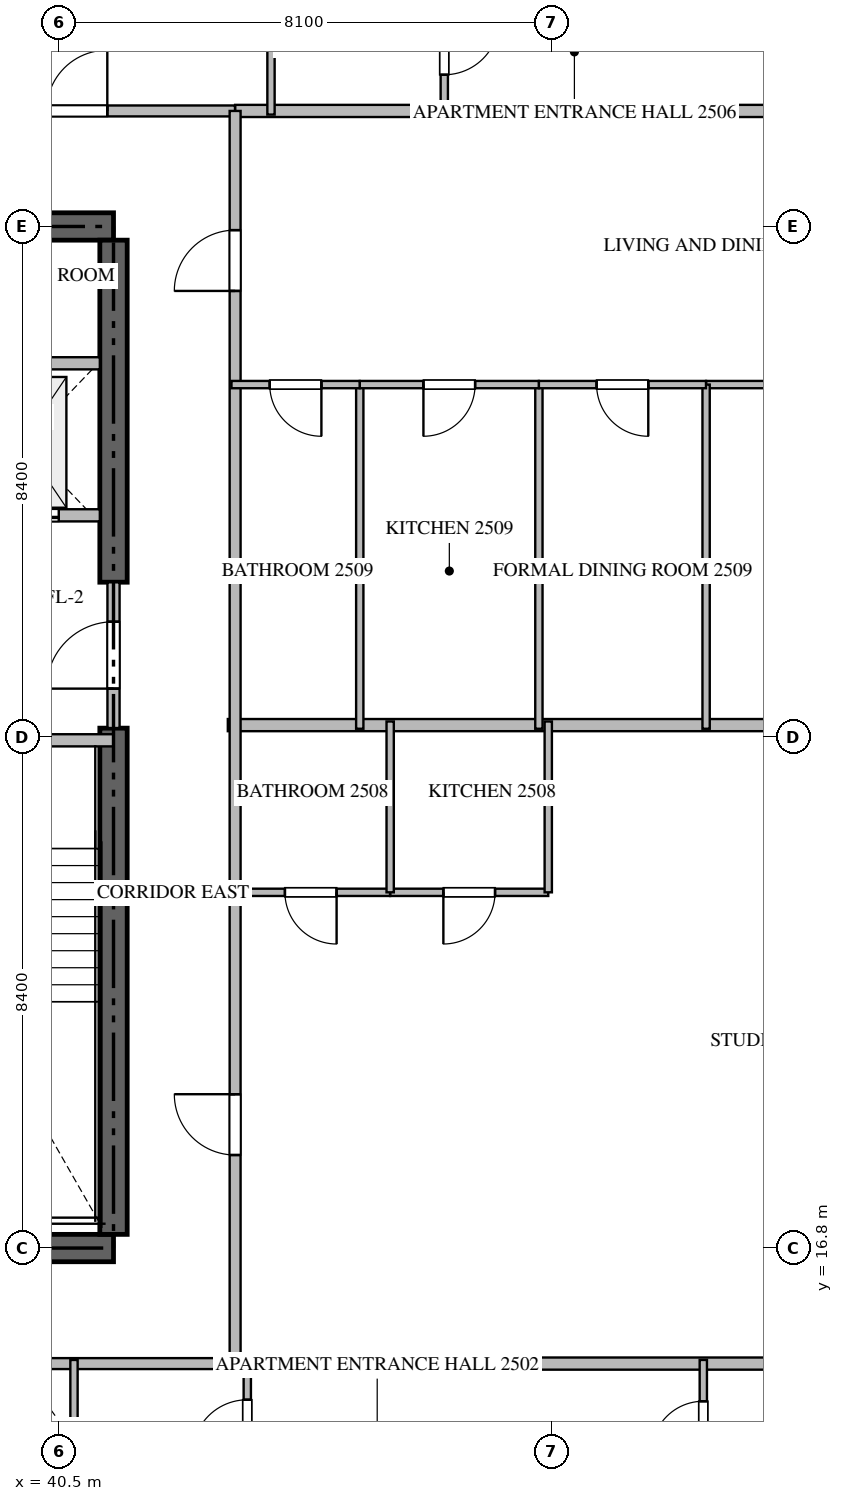
"""IFC4 building model, lengths in metres.
Left out: names, types, materials, properties, quantities, classifications, styles, units other than length and angle.
Written with IfcOpenShell. Run it as: python <this file> out.ifc"""

import sys

from ifc_helpers import new_model, si_unit, direction, frame, frame_2d, origin, place, context, subcontext, project, spatial, rectangle, extrude, source, transform, mapped, element, fill, save


model = new_model("IFC4")
c1 = context("Model", 3, precision=1e-05, world=origin(), true_north=direction((0.0, 1.0)))
c2 = subcontext(c1, "Body", "Model", "MODEL_VIEW")
j1 = project(units=[si_unit("LENGTHUNIT", "METRE"), si_unit("PLANEANGLEUNIT", "RADIAN")], contexts=[c1])
p1 = place(None, origin())
s1 = spatial("IfcSite", under=j1, at=p1, CompositionType="ELEMENT")
p2 = place(p1, origin())
s2 = spatial("IfcBuilding", under=s1, at=p2, CompositionType="ELEMENT")
p3 = place(p2, frame((0.0, 0.0, 101.7)))
s3 = spatial("IfcBuildingStorey", under=s2, at=p3, CompositionType="ELEMENT", Elevation=101.7)
for number, where, z_axis, x_axis in (
    (1, (23.4, 16.8, -0.26), (0.0, 0.0, 1.0), (1.0, 0.0, 0.0)),
    (2, (41.4, 33.6, -0.26), (0.0, 0.0, 1.0), (-1.0, 0.0, 0.0)),
):
    element("IfcWall", number, at=place(p3, frame(where, z_axis=z_axis, x_axis=x_axis)), inside=s3, PredefinedType="SHEAR", context=c2, shape_type="SweptSolid", body=[
        extrude(rectangle(XDim=18.0, YDim=0.45, at=frame_2d((9.0, 0.0))), origin(), (0.0, 0.0, 1.0), 3.748),
    ])
p4 = place(p3, frame((41.4, 17.025, -0.26), z_axis=(0.0, 0.0, 1.0), x_axis=(0.0, 1.0, 0.0)))
e3 = element("IfcWall", 3, at=p4, inside=s3, PredefinedType="SHEAR", context=c2, shape_type="SweptSolid", body=[
    extrude(rectangle(XDim=8.325, YDim=0.45, at=frame_2d((4.163, 0.0))), origin(), (0.0, 0.0, 1.0), 3.748),
])
p5 = place(p3, frame((41.4, 27.75, -0.26), z_axis=(0.0, 0.0, 1.0), x_axis=(0.0, 1.0, 0.0)))
e4 = element("IfcWall", 4, at=p5, inside=s3, PredefinedType="SHEAR", context=c2, shape_type="SweptSolid", body=[
    extrude(rectangle(XDim=5.625, YDim=0.45, at=frame_2d((2.812, 0.0))), origin(), (0.0, 0.0, 1.0), 3.748),
])
p6 = place(p3, frame((36.95, 25.15, 0.0), z_axis=(0.0, 0.0, 1.0), x_axis=(1.0, 0.0, 0.0)))
e5 = element("IfcWall", 5, at=p6, inside=s3, PredefinedType="STANDARD", context=c2, shape_type="SweptSolid", body=[
    extrude(rectangle(XDim=4.45, YDim=0.2, at=frame_2d((2.225, 0.0))), origin(), (0.0, 0.0, 1.0), 3.49),
])
p7 = place(p6, frame((1.65, 0.0, 0.0)))
e6 = element("IfcOpeningElement", 6, at=p7, cuts=e5, PredefinedType="OPENING", context=c2, shape_type="SweptSolid", body=[
    extrude(rectangle(XDim=1.1, YDim=2.15, at=frame_2d((0.55, 1.075))), frame((0.0, 0.11, 0.0), z_axis=(0.0, -1.0, 0.0), x_axis=(1.0, 0.0, 0.0)), (0.0, 0.0, 1.0), 0.22),
])
p8 = place(p3, frame((38.75, 28.85, 0.0), z_axis=(0.0, 0.0, 1.0), x_axis=(1.0, 0.0, 0.0)))
e7 = element("IfcWall", 7, at=p8, inside=s3, PredefinedType="STANDARD", context=c2, shape_type="SweptSolid", body=[
    extrude(rectangle(XDim=2.425, YDim=0.2, at=frame_2d((1.212, 0.0))), origin(), (0.0, 0.0, 1.0), 3.49),
])
p9 = place(p8, frame((0.55, 0.0, 0.0)))
e8 = element("IfcOpeningElement", 8, at=p9, cuts=e7, PredefinedType="OPENING", context=c2, shape_type="SweptSolid", body=[
    extrude(rectangle(XDim=1.2, YDim=2.2, at=frame_2d((0.6, 1.1))), frame((0.0, 0.11, 0.0), z_axis=(0.0, -1.0, 0.0), x_axis=(1.0, 0.0, 0.0)), (0.0, 0.0, 1.0), 0.22),
])
p10 = place(p3, frame((38.75, 31.35, 0.0), z_axis=(0.0, 0.0, 1.0), x_axis=(1.0, 0.0, 0.0)))
e9 = element("IfcWall", 9, at=p10, inside=s3, PredefinedType="STANDARD", context=c2, shape_type="SweptSolid", body=[
    extrude(rectangle(XDim=2.425, YDim=0.2, at=frame_2d((1.212, 0.0))), origin(), (0.0, 0.0, 1.0), 3.49),
])
p11 = place(p3, frame((41.4, 25.352, 0.0), z_axis=(0.0, 0.0, 1.0), x_axis=(0.0, 1.0, 0.0)))
e10 = element("IfcWall", 10, at=p11, inside=s3, PredefinedType="STANDARD", context=c2, shape_type="SweptSolid", body=[
    extrude(rectangle(XDim=2.396, YDim=0.2, at=frame_2d((1.198, 0.0))), origin(), (0.0, 0.0, 1.0), 3.49),
])
p12 = place(p11, frame((0.648, 0.0, 0.0)))
e11 = element("IfcOpeningElement", 11, at=p12, cuts=e10, PredefinedType="OPENING", context=c2, shape_type="SweptSolid", body=[
    extrude(rectangle(XDim=1.1, YDim=2.15, at=frame_2d((0.55, 1.075))), frame((0.0, 0.11, 0.0), z_axis=(0.0, -1.0, 0.0), x_axis=(1.0, 0.0, 0.0)), (0.0, 0.0, 1.0), 0.22),
])
p13 = place(p3, frame((43.28, 25.4, 0.0), z_axis=(0.0, 0.0, 1.0), x_axis=(1.0, 0.0, 0.0)))
e12 = element("IfcWall", 12, at=p13, inside=s3, PredefinedType="PARTITIONING", context=c2, shape_type="SweptSolid", body=[
    extrude(rectangle(XDim=15.438, YDim=0.2, at=frame_2d((7.719, 0.0))), origin(), (0.0, 0.0, 1.0), 3.49),
])
for number, where, z_axis, x_axis in (
    (13, (43.4, 14.9, 0.0), (0.0, 0.0, 1.0), (1.0, 0.0, 0.0)),
    (14, (43.4, 35.5, 0.0), (0.0, 0.0, 1.0), (1.0, 0.0, 0.0)),
):
    element("IfcWall", number, at=place(p3, frame(where, z_axis=z_axis, x_axis=x_axis)), inside=s3, PredefinedType="PARTITIONING", context=c2, shape_type="SweptSolid", body=[
        extrude(rectangle(XDim=15.318, YDim=0.2, at=frame_2d((7.659, 0.0))), origin(), (0.0, 0.0, 1.0), 3.49),
    ])
p14 = place(p3, frame((21.402, 14.9, 0.0), z_axis=(0.0, 0.0, 1.0), x_axis=(1.0, 0.0, 0.0)))
e15 = element("IfcWall", 15, at=p14, inside=s3, PredefinedType="PARTITIONING", context=c2, shape_type="SweptSolid", body=[
    extrude(rectangle(XDim=21.996, YDim=0.18, at=frame_2d((10.998, 0.0))), origin(), (0.0, 0.0, 1.0), 3.49),
])
p15 = place(p14, frame((10.351, 0.0, 0.0)))
e16 = element("IfcOpeningElement", 16, at=p15, cuts=e15, PredefinedType="OPENING", context=c2, shape_type="SweptSolid", body=[
    extrude(rectangle(XDim=1.0, YDim=2.15, at=frame_2d((0.5, 1.075))), frame((0.0, 0.1, 0.0), z_axis=(0.0, -1.0, 0.0), x_axis=(1.0, 0.0, 0.0)), (0.0, 0.0, 1.0), 0.2),
])
p16 = place(p14, frame((15.978, 0.0, 0.0)))
e17 = element("IfcOpeningElement", 17, at=p16, cuts=e15, PredefinedType="OPENING", context=c2, shape_type="SweptSolid", body=[
    extrude(rectangle(XDim=1.0, YDim=2.15, at=frame_2d((0.5, 1.075))), frame((0.0, 0.1, 0.0), z_axis=(0.0, -1.0, 0.0), x_axis=(1.0, 0.0, 0.0)), (0.0, 0.0, 1.0), 0.2),
])
p17 = place(p3, frame((21.402, 35.5, 0.0), z_axis=(0.0, 0.0, 1.0), x_axis=(1.0, 0.0, 0.0)))
e18 = element("IfcWall", 18, at=p17, inside=s3, PredefinedType="PARTITIONING", context=c2, shape_type="SweptSolid", body=[
    extrude(rectangle(XDim=21.996, YDim=0.18, at=frame_2d((10.998, 0.0))), origin(), (0.0, 0.0, 1.0), 3.49),
])
p18 = place(p17, frame((1.96, 0.0, 0.0)))
e19 = element("IfcOpeningElement", 19, at=p18, cuts=e18, PredefinedType="OPENING", context=c2, shape_type="SweptSolid", body=[
    extrude(rectangle(XDim=1.0, YDim=2.15, at=frame_2d((0.5, 1.075))), frame((0.0, 0.1, 0.0), z_axis=(0.0, -1.0, 0.0), x_axis=(1.0, 0.0, 0.0)), (0.0, 0.0, 1.0), 0.2),
])
p19 = place(p17, frame((5.249, 0.0, 0.0)))
e20 = element("IfcOpeningElement", 20, at=p19, cuts=e18, PredefinedType="OPENING", context=c2, shape_type="SweptSolid", body=[
    extrude(rectangle(XDim=1.0, YDim=2.15, at=frame_2d((0.5, 1.075))), frame((0.0, 0.1, 0.0), z_axis=(0.0, -1.0, 0.0), x_axis=(1.0, 0.0, 0.0)), (0.0, 0.0, 1.0), 0.2),
])
p20 = place(p17, frame((11.653, 0.0, 0.0)))
e21 = element("IfcOpeningElement", 21, at=p20, cuts=e18, PredefinedType="OPENING", context=c2, shape_type="SweptSolid", body=[
    extrude(rectangle(XDim=1.0, YDim=2.15, at=frame_2d((0.5, 1.075))), frame((0.0, 0.1, 0.0), z_axis=(0.0, -1.0, 0.0), x_axis=(1.0, 0.0, 0.0)), (0.0, 0.0, 1.0), 0.2),
])
p21 = place(p17, frame((18.896, 0.0, 0.0)))
e22 = element("IfcOpeningElement", 22, at=p21, cuts=e18, PredefinedType="OPENING", context=c2, shape_type="SweptSolid", body=[
    extrude(rectangle(XDim=1.0, YDim=2.15, at=frame_2d((0.5, 1.075))), frame((0.0, 0.1, 0.0), z_axis=(0.0, -1.0, 0.0), x_axis=(1.0, 0.0, 0.0)), (0.0, 0.0, 1.0), 0.2),
])
p22 = place(p3, frame((43.4, 14.9, 0.0), z_axis=(0.0, 0.0, 1.0), x_axis=(0.0, 1.0, 0.0)))
e23 = element("IfcWall", 23, at=p22, inside=s3, PredefinedType="PARTITIONING", context=c2, shape_type="SweptSolid", body=[
    extrude(rectangle(XDim=20.6, YDim=0.18, at=frame_2d((10.3, 0.0))), origin(), (0.0, 0.0, 1.0), 3.49),
])
p23 = place(p22, frame((3.43, 0.0, 0.0)))
e24 = element("IfcOpeningElement", 24, at=p23, cuts=e23, PredefinedType="OPENING", context=c2, shape_type="SweptSolid", body=[
    extrude(rectangle(XDim=1.0, YDim=2.15, at=frame_2d((0.5, 1.075))), frame((0.0, 0.1, 0.0), z_axis=(0.0, -1.0, 0.0), x_axis=(1.0, 0.0, 0.0)), (0.0, 0.0, 1.0), 0.2),
])
p24 = place(p22, frame((17.64, 0.0, 0.0)))
e25 = element("IfcOpeningElement", 25, at=p24, cuts=e23, PredefinedType="OPENING", context=c2, shape_type="SweptSolid", body=[
    extrude(rectangle(XDim=1.0, YDim=2.15, at=frame_2d((0.5, 1.075))), frame((0.0, 0.1, 0.0), z_axis=(0.0, -1.0, 0.0), x_axis=(1.0, 0.0, 0.0)), (0.0, 0.0, 1.0), 0.2),
])
p25 = place(p3, frame((40.75, 12.15, 0.0), z_axis=(0.0, 0.0, 1.0), x_axis=(0.0, 1.0, 0.0)))
e26 = element("IfcWall", 26, at=p25, inside=s3, PredefinedType="PARTITIONING", context=c2, shape_type="SweptSolid", body=[
    extrude(rectangle(XDim=2.81, YDim=0.12, at=frame_2d((1.405, 0.0))), origin(), (0.0, 0.0, 1.0), 3.49),
])
p26 = place(p3, frame((43.6, 12.75, 0.0), z_axis=(0.0, 0.0, 1.0), x_axis=(0.0, 1.0, 0.0)))
e27 = element("IfcWall", 27, at=p26, inside=s3, PredefinedType="PARTITIONING", context=c2, shape_type="SweptSolid", body=[
    extrude(rectangle(XDim=2.21, YDim=0.12, at=frame_2d((1.105, 0.0))), origin(), (0.0, 0.0, 1.0), 3.49),
])
p27 = place(p26, frame((0.655, 0.0, 0.0)))
e28 = element("IfcOpeningElement", 28, at=p27, cuts=e27, PredefinedType="OPENING", context=c2, shape_type="SweptSolid", body=[
    extrude(rectangle(XDim=0.9, YDim=2.1, at=frame_2d((0.45, 1.05))), frame((0.0, 0.07, 0.0), z_axis=(0.0, -1.0, 0.0), x_axis=(1.0, 0.0, 0.0)), (0.0, 0.0, 1.0), 0.14),
])
p28 = place(p3, frame((51.1, 12.752, 0.0), z_axis=(0.0, 0.0, 1.0), x_axis=(0.0, 1.0, 0.0)))
e29 = element("IfcWall", 29, at=p28, inside=s3, PredefinedType="PARTITIONING", context=c2, shape_type="SweptSolid", body=[
    extrude(rectangle(XDim=2.208, YDim=0.12, at=frame_2d((1.104, 0.0))), origin(), (0.0, 0.0, 1.0), 3.49),
])
p29 = place(p28, frame((0.679, 0.0, 0.0)))
e30 = element("IfcOpeningElement", 30, at=p29, cuts=e29, PredefinedType="OPENING", context=c2, shape_type="SweptSolid", body=[
    extrude(rectangle(XDim=0.85, YDim=2.1, at=frame_2d((0.425, 1.05))), frame((0.0, 0.07, 0.0), z_axis=(0.0, -1.0, 0.0), x_axis=(1.0, 0.0, 0.0)), (0.0, 0.0, 1.0), 0.14),
])
p30 = place(p3, frame((43.99, 38.25, 0.0), z_axis=(0.0, 0.0, 1.0), x_axis=(0.0, -1.0, 0.0)))
e31 = element("IfcWall", 31, at=p30, inside=s3, PredefinedType="PARTITIONING", context=c2, shape_type="SweptSolid", body=[
    extrude(rectangle(XDim=2.81, YDim=0.12, at=frame_2d((1.405, 0.0))), origin(), (0.0, 0.0, 1.0), 3.49),
])
p31 = place(p3, frame((46.84, 37.65, 0.0), z_axis=(0.0, 0.0, 1.0), x_axis=(0.0, -1.0, 0.0)))
e32 = element("IfcWall", 32, at=p31, inside=s3, PredefinedType="PARTITIONING", context=c2, shape_type="SweptSolid", body=[
    extrude(rectangle(XDim=2.21, YDim=0.12, at=frame_2d((1.105, 0.0))), origin(), (0.0, 0.0, 1.0), 3.49),
])
p32 = place(p31, frame((0.655, 0.0, 0.0)))
e33 = element("IfcOpeningElement", 33, at=p32, cuts=e32, PredefinedType="OPENING", context=c2, shape_type="SweptSolid", body=[
    extrude(rectangle(XDim=0.9, YDim=2.1, at=frame_2d((0.45, 1.05))), frame((0.0, 0.07, 0.0), z_axis=(0.0, -1.0, 0.0), x_axis=(1.0, 0.0, 0.0)), (0.0, 0.0, 1.0), 0.14),
])
p33 = place(p3, frame((48.55, 22.65, 0.0), z_axis=(0.0, 0.0, 1.0), x_axis=(-1.0, 0.0, 0.0)))
e34 = element("IfcWall", 34, at=p33, inside=s3, PredefinedType="PARTITIONING", context=c2, shape_type="SweptSolid", body=[
    extrude(rectangle(XDim=2.6, YDim=0.12, at=frame_2d((1.3, 0.0))), origin(), (0.0, 0.0, 1.0), 3.49),
])
p34 = place(p33, frame((0.875, 0.0, 0.0)))
e35 = element("IfcOpeningElement", 35, at=p34, cuts=e34, PredefinedType="OPENING", context=c2, shape_type="SweptSolid", body=[
    extrude(rectangle(XDim=0.85, YDim=2.1, at=frame_2d((0.425, 1.05))), frame((0.0, 0.07, 0.0), z_axis=(0.0, -1.0, 0.0), x_axis=(1.0, 0.0, 0.0)), (0.0, 0.0, 1.0), 0.14),
])
p35 = place(p3, frame((45.948, 22.65, 0.0), z_axis=(0.0, 0.0, 1.0), x_axis=(-1.0, 0.0, 0.0)))
e36 = element("IfcWall", 36, at=p35, inside=s3, PredefinedType="PARTITIONING", context=c2, shape_type="SweptSolid", body=[
    extrude(rectangle(XDim=2.608, YDim=0.12, at=frame_2d((1.304, 0.0))), origin(), (0.0, 0.0, 1.0), 3.49),
])
p36 = place(p35, frame((0.879, 0.0, 0.0)))
e37 = element("IfcOpeningElement", 37, at=p36, cuts=e36, PredefinedType="OPENING", context=c2, shape_type="SweptSolid", body=[
    extrude(rectangle(XDim=0.85, YDim=2.1, at=frame_2d((0.425, 1.05))), frame((0.0, 0.07, 0.0), z_axis=(0.0, -1.0, 0.0), x_axis=(1.0, 0.0, 0.0)), (0.0, 0.0, 1.0), 0.14),
])
for number, where, z_axis, x_axis in (
    (38, (45.95, 22.65, 0.0), (0.0, 0.0, 1.0), (0.0, 1.0, 0.0)),
    (39, (48.55, 22.65, 0.0), (0.0, 0.0, 1.0), (0.0, 1.0, 0.0)),
):
    element("IfcWall", number, at=place(p3, frame(where, z_axis=z_axis, x_axis=x_axis)), inside=s3, PredefinedType="PARTITIONING", context=c2, shape_type="SweptSolid", body=[
        extrude(rectangle(XDim=2.81, YDim=0.12, at=frame_2d((1.405, 0.0))), origin(), (0.0, 0.0, 1.0), 3.49),
    ])
p37 = place(p3, frame((58.705, 31.0, 0.0), z_axis=(0.0, 0.0, 1.0), x_axis=(-1.0, 0.0, 0.0)))
e40 = element("IfcWall", 40, at=p37, inside=s3, PredefinedType="PARTITIONING", context=c2, shape_type="SweptSolid", body=[
    extrude(rectangle(XDim=7.559, YDim=0.12, at=frame_2d((3.78, 0.0))), origin(), (0.0, 0.0, 1.0), 3.49),
])
p38 = place(p37, frame((3.662, 0.0, 0.0)))
e41 = element("IfcOpeningElement", 41, at=p38, cuts=e40, PredefinedType="OPENING", context=c2, shape_type="SweptSolid", body=[
    extrude(rectangle(XDim=0.9, YDim=2.1, at=frame_2d((0.45, 1.05))), frame((0.0, 0.07, 0.0), z_axis=(0.0, -1.0, 0.0), x_axis=(1.0, 0.0, 0.0)), (0.0, 0.0, 1.0), 0.14),
])
for number, where, z_axis, x_axis in (
    (42, (51.146, 25.34, 0.0), (0.0, 0.0, 1.0), (0.0, 1.0, 0.0)),
    (43, (48.396, 25.34, 0.0), (0.0, 0.0, 1.0), (0.0, 1.0, 0.0)),
    (44, (45.45, 25.34, 0.0), (0.0, 0.0, 1.0), (0.0, 1.0, 0.0)),
):
    element("IfcWall", number, at=place(p3, frame(where, z_axis=z_axis, x_axis=x_axis)), inside=s3, PredefinedType="PARTITIONING", context=c2, shape_type="SweptSolid", body=[
        extrude(rectangle(XDim=5.66, YDim=0.12, at=frame_2d((2.83, 0.0))), origin(), (0.0, 0.0, 1.0), 3.49),
    ])
p39 = place(p3, frame((51.144, 31.0, 0.0), z_axis=(0.0, 0.0, 1.0), x_axis=(-1.0, 0.0, 0.0)))
e45 = element("IfcWall", 45, at=p39, inside=s3, PredefinedType="PARTITIONING", context=c2, shape_type="SweptSolid", body=[
    extrude(rectangle(XDim=2.748, YDim=0.12, at=frame_2d((1.374, 0.0))), origin(), (0.0, 0.0, 1.0), 3.49),
])
p40 = place(p39, frame((0.949, 0.0, 0.0)))
e46 = element("IfcOpeningElement", 46, at=p40, cuts=e45, PredefinedType="OPENING", context=c2, shape_type="SweptSolid", body=[
    extrude(rectangle(XDim=0.85, YDim=2.1, at=frame_2d((0.425, 1.05))), frame((0.0, 0.07, 0.0), z_axis=(0.0, -1.0, 0.0), x_axis=(1.0, 0.0, 0.0)), (0.0, 0.0, 1.0), 0.14),
])
p41 = place(p3, frame((48.394, 31.0, 0.0), z_axis=(0.0, 0.0, 1.0), x_axis=(-1.0, 0.0, 0.0)))
e47 = element("IfcWall", 47, at=p41, inside=s3, PredefinedType="PARTITIONING", context=c2, shape_type="SweptSolid", body=[
    extrude(rectangle(XDim=2.944, YDim=0.12, at=frame_2d((1.472, 0.0))), origin(), (0.0, 0.0, 1.0), 3.49),
])
p42 = place(p41, frame((1.047, 0.0, 0.0)))
e48 = element("IfcOpeningElement", 48, at=p42, cuts=e47, PredefinedType="OPENING", context=c2, shape_type="SweptSolid", body=[
    extrude(rectangle(XDim=0.85, YDim=2.1, at=frame_2d((0.425, 1.05))), frame((0.0, 0.07, 0.0), z_axis=(0.0, -1.0, 0.0), x_axis=(1.0, 0.0, 0.0)), (0.0, 0.0, 1.0), 0.14),
])
p43 = place(p3, frame((45.448, 31.0, 0.0), z_axis=(0.0, 0.0, 1.0), x_axis=(-1.0, 0.0, 0.0)))
e49 = element("IfcWall", 49, at=p43, inside=s3, PredefinedType="PARTITIONING", context=c2, shape_type="SweptSolid", body=[
    extrude(rectangle(XDim=2.108, YDim=0.12, at=frame_2d((1.054, 0.0))), origin(), (0.0, 0.0, 1.0), 3.49),
])
p44 = place(p43, frame((0.629, 0.0, 0.0)))
e50 = element("IfcOpeningElement", 50, at=p44, cuts=e49, PredefinedType="OPENING", context=c2, shape_type="SweptSolid", body=[
    extrude(rectangle(XDim=0.85, YDim=2.1, at=frame_2d((0.425, 1.05))), frame((0.0, 0.07, 0.0), z_axis=(0.0, -1.0, 0.0), x_axis=(1.0, 0.0, 0.0)), (0.0, 0.0, 1.0), 0.14),
])
m1 = source(origin(), c2, "Body", "SweptSolid", [
    extrude(rectangle(XDim=1.2, YDim=2.2, at=frame_2d((0.6, 1.1))), frame((0.0, 0.025, 0.0), z_axis=(0.0, -1.0, 0.0), x_axis=(1.0, 0.0, 0.0)), (0.0, 0.0, 1.0), 0.05),
])
p45 = place(p9, origin())
e51 = element("IfcDoor", 51, at=p45, inside=s3, OperationType="DOUBLE_DOOR_SLIDING", PredefinedType="DOOR", context=c2, shape_type="MappedRepresentation", body=[
    mapped(m1, transform((0.0, 0.0, 0.0), scale=1.0)),
])
fill(e8, e51)
m2 = source(origin(), c2, "Body", "SweptSolid", [
    extrude(rectangle(XDim=1.1, YDim=2.15, at=frame_2d((0.55, 1.075))), frame((0.0, 0.025, 0.0), z_axis=(0.0, -1.0, 0.0), x_axis=(1.0, 0.0, 0.0)), (0.0, 0.0, 1.0), 0.05),
])
p46 = place(p12, origin())
e52 = element("IfcDoor", 52, at=p46, inside=s3, OperationType="SINGLE_SWING_LEFT", PredefinedType="DOOR", context=c2, shape_type="MappedRepresentation", body=[
    mapped(m2, transform((0.0, 0.0, 0.0), scale=1.0)),
])
fill(e11, e52)
m3 = source(origin(), c2, "Body", "SweptSolid", [
    extrude(rectangle(XDim=1.0, YDim=2.15, at=frame_2d((0.5, 1.075))), frame((0.0, 0.025, 0.0), z_axis=(0.0, -1.0, 0.0), x_axis=(1.0, 0.0, 0.0)), (0.0, 0.0, 1.0), 0.05),
])
p47 = place(p21, origin())
e53 = element("IfcDoor", 53, at=p47, inside=s3, OperationType="SINGLE_SWING_RIGHT", PredefinedType="DOOR", context=c2, shape_type="MappedRepresentation", body=[
    mapped(m3, transform((0.0, 0.0, 0.0), scale=1.0)),
])
fill(e22, e53)
p48 = place(p23, origin())
e54 = element("IfcDoor", 54, at=p48, inside=s3, OperationType="SINGLE_SWING_RIGHT", PredefinedType="DOOR", context=c2, shape_type="MappedRepresentation", body=[
    mapped(m3, transform((0.0, 0.0, 0.0), scale=1.0)),
])
fill(e24, e54)
p49 = place(p24, origin())
e55 = element("IfcDoor", 55, at=p49, inside=s3, OperationType="SINGLE_SWING_LEFT", PredefinedType="DOOR", context=c2, shape_type="MappedRepresentation", body=[
    mapped(m3, transform((0.0, 0.0, 0.0), scale=1.0)),
])
fill(e25, e55)
m4 = source(origin(), c2, "Body", "SweptSolid", [
    extrude(rectangle(XDim=0.9, YDim=2.1, at=frame_2d((0.45, 1.05))), frame((0.0, 0.025, 0.0), z_axis=(0.0, -1.0, 0.0), x_axis=(1.0, 0.0, 0.0)), (0.0, 0.0, 1.0), 0.05),
])
p50 = place(p27, origin())
e56 = element("IfcDoor", 56, at=p50, inside=s3, OperationType="SINGLE_SWING_LEFT", PredefinedType="DOOR", context=c2, shape_type="MappedRepresentation", body=[
    mapped(m4, transform((0.0, 0.0, 0.0), scale=1.0)),
])
fill(e28, e56)
m5 = source(origin(), c2, "Body", "SweptSolid", [
    extrude(rectangle(XDim=0.85, YDim=2.1, at=frame_2d((0.425, 1.05))), frame((0.0, 0.025, 0.0), z_axis=(0.0, -1.0, 0.0), x_axis=(1.0, 0.0, 0.0)), (0.0, 0.0, 1.0), 0.05),
])
p51 = place(p29, origin())
e57 = element("IfcDoor", 57, at=p51, inside=s3, OperationType="SINGLE_SWING_LEFT", PredefinedType="DOOR", context=c2, shape_type="MappedRepresentation", body=[
    mapped(m5, transform((0.0, 0.0, 0.0), scale=1.0)),
])
fill(e30, e57)
p52 = place(p32, origin())
e58 = element("IfcDoor", 58, at=p52, inside=s3, OperationType="SINGLE_SWING_LEFT", PredefinedType="DOOR", context=c2, shape_type="MappedRepresentation", body=[
    mapped(m4, transform((0.0, 0.0, 0.0), scale=1.0)),
])
fill(e33, e58)
p53 = place(p34, origin())
e59 = element("IfcDoor", 59, at=p53, inside=s3, OperationType="SINGLE_SWING_RIGHT", PredefinedType="DOOR", context=c2, shape_type="MappedRepresentation", body=[
    mapped(m5, transform((0.0, 0.0, 0.0), scale=1.0)),
])
fill(e35, e59)
p54 = place(p36, origin())
e60 = element("IfcDoor", 60, at=p54, inside=s3, OperationType="SINGLE_SWING_LEFT", PredefinedType="DOOR", context=c2, shape_type="MappedRepresentation", body=[
    mapped(m5, transform((0.0, 0.0, 0.0), scale=1.0)),
])
fill(e37, e60)
p55 = place(p40, origin())
e61 = element("IfcDoor", 61, at=p55, inside=s3, OperationType="SINGLE_SWING_LEFT", PredefinedType="DOOR", context=c2, shape_type="MappedRepresentation", body=[
    mapped(m5, transform((0.0, 0.0, 0.0), scale=1.0)),
])
fill(e46, e61)
p56 = place(p42, origin())
e62 = element("IfcDoor", 62, at=p56, inside=s3, OperationType="SINGLE_SWING_RIGHT", PredefinedType="DOOR", context=c2, shape_type="MappedRepresentation", body=[
    mapped(m5, transform((0.0, 0.0, 0.0), scale=1.0)),
])
fill(e48, e62)
p57 = place(p44, origin())
e63 = element("IfcDoor", 63, at=p57, inside=s3, OperationType="SINGLE_SWING_LEFT", PredefinedType="DOOR", context=c2, shape_type="MappedRepresentation", body=[
    mapped(m5, transform((0.0, 0.0, 0.0), scale=1.0)),
])
fill(e50, e63)
save(model, sys.argv[1])
